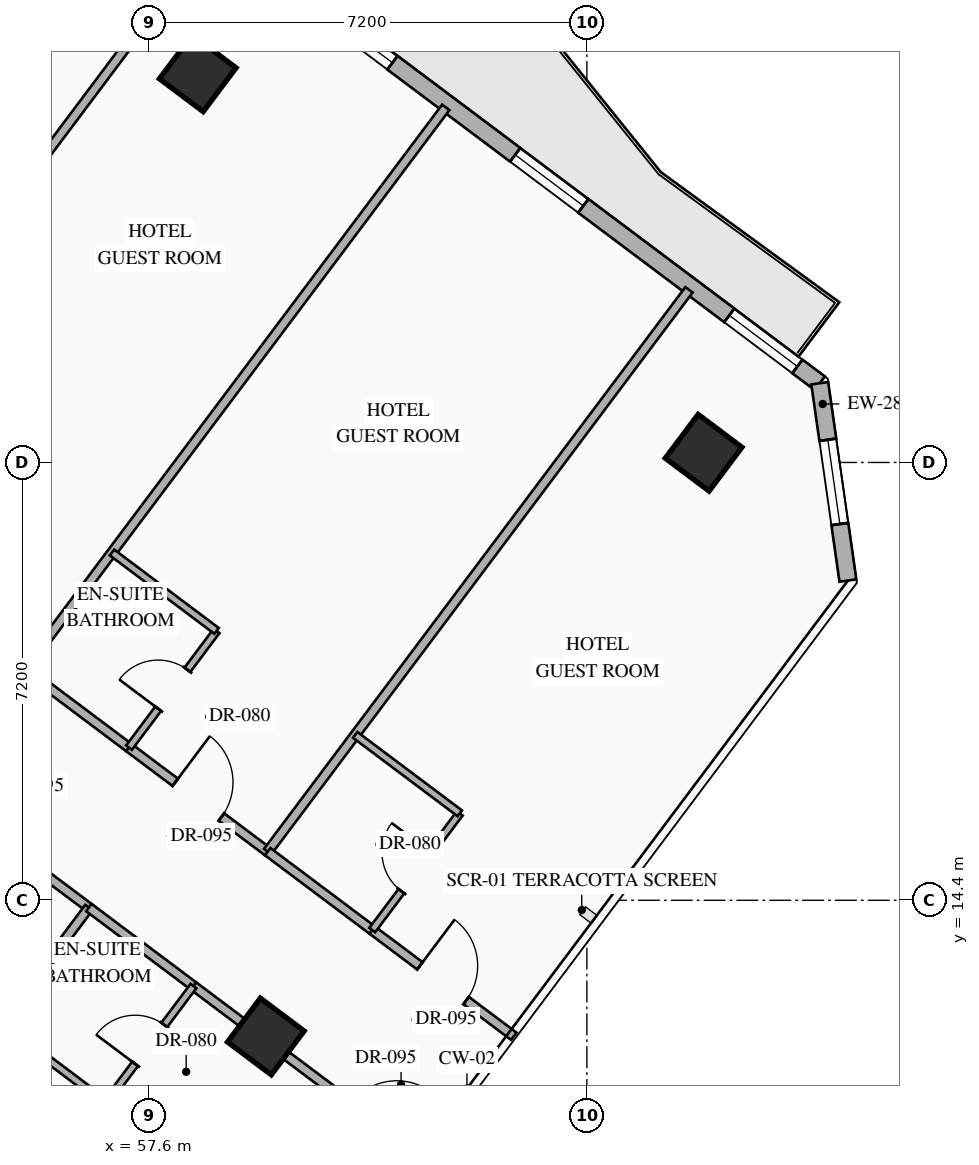
"""IFC4 building model, lengths in metres.
Left out: names, types, materials, properties, quantities, classifications, styles, units other than length and angle.
Written with IfcOpenShell. Run it as: python <this file> out.ifc"""

import sys

from ifc_helpers import new_model, si_unit, direction, frame, frame_2d, origin, origin_2d, place, context, subcontext, project, spatial, rectangle, hollow_rectangle, extrude, element, fill, save


model = new_model("IFC4")
c1 = context("Model", 3, precision=1e-05, world=origin(), true_north=direction((0.0, 1.0)))
c2 = subcontext(c1, "Body", "Model", "MODEL_VIEW")
j1 = project(units=[si_unit("LENGTHUNIT", "METRE"), si_unit("PLANEANGLEUNIT", "RADIAN")], contexts=[c1])
p1 = place(None, origin())
s1 = spatial("IfcSite", under=j1, at=p1, CompositionType="ELEMENT")
p2 = place(p1, origin())
s2 = spatial("IfcBuilding", under=s1, at=p2, CompositionType="ELEMENT")
p3 = place(p2, frame((0.0, 0.0, 81.3)))
s3 = spatial("IfcBuildingStorey", under=s2, at=p3, CompositionType="ELEMENT", Elevation=81.3)
for number, where, z_axis, x_axis in (
    (1, (58.4, 28.0, 0.0), (0.0, 0.0, 1.0), (0.8, -0.6, 0.0)),
    (2, (66.72, 21.76, 0.0), (0.0, 0.0, 1.0), (0.8, -0.6, 0.0)),
    (3, (59.52, 12.16, 0.0), (0.0, 0.0, 1.0), (0.8, -0.6, 0.0)),
):
    element("IfcColumn", number, at=place(p3, frame(where, z_axis=z_axis, x_axis=x_axis)), inside=s3, PredefinedType="COLUMN", context=c2, shape_type="SweptSolid", body=[
        extrude(hollow_rectangle(XDim=0.9, YDim=0.9, WallThickness=0.036, at=origin_2d()), origin(), (0.0, 0.0, 1.0), 3.35),
    ])
p4 = place(p3, frame((44.86, 40.73, 0.0), z_axis=(0.0, 0.0, 1.0), x_axis=(0.800006902154, -0.599990797017, 0.0)))
e4 = element("IfcWall", 4, at=p4, inside=s3, PredefinedType="STANDARD", context=c2, shape_type="SweptSolid", body=[
    extrude(rectangle(XDim=29.712, YDim=0.28, at=frame_2d((14.856, 0.0))), origin(), (0.0, 0.0, 1.0), 3.13),
])
p5 = place(p4, frame((14.249, 0.0, 0.0)))
e5 = element("IfcOpeningElement", 5, at=p5, cuts=e4, PredefinedType="OPENING", context=c2, shape_type="SweptSolid", body=[
    extrude(rectangle(XDim=1.1, YDim=2.2, at=frame_2d((0.55, 1.1))), frame((0.0, 0.15, 0.0), z_axis=(0.0, -1.0, 0.0), x_axis=(1.0, 0.0, 0.0)), (0.0, 0.0, 1.0), 0.3),
])
p6 = place(p4, frame((1.612, 0.0, 0.85)))
e6 = element("IfcOpeningElement", 6, at=p6, cuts=e4, PredefinedType="OPENING", context=c2, shape_type="SweptSolid", body=[
    extrude(rectangle(XDim=1.4, YDim=1.8, at=frame_2d((0.7, 0.9))), frame((0.0, 0.15, 0.0), z_axis=(0.0, -1.0, 0.0), x_axis=(1.0, 0.0, 0.0)), (0.0, 0.0, 1.0), 0.3),
])
p7 = place(p4, frame((5.667, 0.0, 0.85)))
e7 = element("IfcOpeningElement", 7, at=p7, cuts=e4, PredefinedType="OPENING", context=c2, shape_type="SweptSolid", body=[
    extrude(rectangle(XDim=1.4, YDim=1.8, at=frame_2d((0.7, 0.9))), frame((0.0, 0.15, 0.0), z_axis=(0.0, -1.0, 0.0), x_axis=(1.0, 0.0, 0.0)), (0.0, 0.0, 1.0), 0.3),
])
p8 = place(p4, frame((9.912, 0.0, 0.85)))
e8 = element("IfcOpeningElement", 8, at=p8, cuts=e4, PredefinedType="OPENING", context=c2, shape_type="SweptSolid", body=[
    extrude(rectangle(XDim=1.4, YDim=1.8, at=frame_2d((0.7, 0.9))), frame((0.0, 0.15, 0.0), z_axis=(0.0, -1.0, 0.0), x_axis=(1.0, 0.0, 0.0)), (0.0, 0.0, 1.0), 0.3),
])
p9 = place(p4, frame((19.528, 0.0, 0.85)))
e9 = element("IfcOpeningElement", 9, at=p9, cuts=e4, PredefinedType="OPENING", context=c2, shape_type="SweptSolid", body=[
    extrude(rectangle(XDim=1.4, YDim=1.8, at=frame_2d((0.7, 0.9))), frame((0.0, 0.15, 0.0), z_axis=(0.0, -1.0, 0.0), x_axis=(1.0, 0.0, 0.0)), (0.0, 0.0, 1.0), 0.3),
])
p10 = place(p4, frame((23.451, 0.0, 0.85)))
e10 = element("IfcOpeningElement", 10, at=p10, cuts=e4, PredefinedType="OPENING", context=c2, shape_type="SweptSolid", body=[
    extrude(rectangle(XDim=1.4, YDim=1.8, at=frame_2d((0.7, 0.9))), frame((0.0, 0.15, 0.0), z_axis=(0.0, -1.0, 0.0), x_axis=(1.0, 0.0, 0.0)), (0.0, 0.0, 1.0), 0.3),
])
p11 = place(p4, frame((27.852, 0.0, 0.85)))
e11 = element("IfcOpeningElement", 11, at=p11, cuts=e4, PredefinedType="OPENING", context=c2, shape_type="SweptSolid", body=[
    extrude(rectangle(XDim=1.4, YDim=1.8, at=frame_2d((0.7, 0.9))), frame((0.0, 0.15, 0.0), z_axis=(0.0, -1.0, 0.0), x_axis=(1.0, 0.0, 0.0)), (0.0, 0.0, 1.0), 0.3),
])
p12 = place(p3, frame((68.63, 22.903, 0.0), z_axis=(0.0, 0.0, 1.0), x_axis=(0.141285803956, -0.989968848803, 0.0)))
e12 = element("IfcWall", 12, at=p12, inside=s3, PredefinedType="STANDARD", context=c2, shape_type="SweptSolid", body=[
    extrude(rectangle(XDim=3.278, YDim=0.28, at=frame_2d((1.639, 0.0))), origin(), (0.0, 0.0, 1.0), 3.13),
])
p13 = place(p12, frame((0.939, 0.0, 0.85)))
e13 = element("IfcOpeningElement", 13, at=p13, cuts=e12, PredefinedType="OPENING", context=c2, shape_type="SweptSolid", body=[
    extrude(rectangle(XDim=1.4, YDim=1.8, at=frame_2d((0.7, 0.9))), frame((0.0, 0.15, 0.0), z_axis=(0.0, -1.0, 0.0), x_axis=(1.0, 0.0, 0.0)), (0.0, 0.0, 1.0), 0.3),
])
for number, where, z_axis, x_axis in (
    (14, (51.71, 21.08, 0.0), (0.0, 0.0, 1.0), (0.6, 0.8, 0.0)),
    (15, (55.55, 18.2, 0.0), (0.0, 0.0, 1.0), (0.6, 0.8, 0.0)),
):
    element("IfcWall", number, at=place(p3, frame(where, z_axis=z_axis, x_axis=x_axis)), inside=s3, PredefinedType="PARTITIONING", context=c2, shape_type="SweptSolid", body=[
        extrude(rectangle(XDim=11.55, YDim=0.15, at=frame_2d((5.775, 0.0))), origin(), (0.0, 0.0, 1.0), 3.13),
    ])
p14 = place(p3, frame((55.55, 18.2, 0.0), z_axis=(0.0, 0.0, 1.0), x_axis=(0.79998637334, -0.60001816845, 0.0)))
e16 = element("IfcWall", 16, at=p14, inside=s3, PredefinedType="PARTITIONING", context=c2, shape_type="SweptSolid", body=[
    extrude(rectangle(XDim=2.15, YDim=0.15, at=frame_2d((1.075, 0.0))), origin(), (0.0, 0.0, 1.0), 2.775),
])
p15 = place(p3, frame((57.27, 16.91, 0.0), z_axis=(0.0, 0.0, 1.0), x_axis=(0.800010279488, -0.599986293772, 0.0)))
e17 = element("IfcWall", 17, at=p15, inside=s3, PredefinedType="PARTITIONING", context=c2, shape_type="SweptSolid", body=[
    extrude(rectangle(XDim=2.85, YDim=0.15, at=frame_2d((1.425, 0.0))), origin(), (0.0, 0.0, 1.0), 2.775),
])
p16 = place(p15, frame((0.95, 0.0, 0.0)))
e18 = element("IfcOpeningElement", 18, at=p16, cuts=e17, PredefinedType="OPENING", context=c2, shape_type="SweptSolid", body=[
    extrude(rectangle(XDim=0.95, YDim=2.15, at=frame_2d((0.475, 1.075))), frame((0.0, 0.085, 0.0), z_axis=(0.0, -1.0, 0.0), x_axis=(1.0, 0.0, 0.0)), (0.0, 0.0, 1.0), 0.17),
])
p17 = place(p3, frame((57.27, 16.91, 0.0), z_axis=(0.0, 0.0, 1.0), x_axis=(0.599951172744, 0.800036618114, 0.0)))
e19 = element("IfcWall", 19, at=p17, inside=s3, PredefinedType="PARTITIONING", context=c2, shape_type="SweptSolid", body=[
    extrude(rectangle(XDim=2.4, YDim=0.12, at=frame_2d((1.2, 0.0))), origin(), (0.0, 0.0, 1.0), 3.13),
])
p18 = place(p17, frame((0.8, 0.0, 0.0)))
e20 = element("IfcOpeningElement", 20, at=p18, cuts=e19, PredefinedType="OPENING", context=c2, shape_type="SweptSolid", body=[
    extrude(rectangle(XDim=0.8, YDim=2.06, at=frame_2d((0.4, 1.03))), frame((0.0, 0.07, 0.0), z_axis=(0.0, -1.0, 0.0), x_axis=(1.0, 0.0, 0.0)), (0.0, 0.0, 1.0), 0.14),
])
p19 = place(p3, frame((56.99, 20.12, 0.0), z_axis=(0.0, 0.0, 1.0), x_axis=(0.79998637334, -0.60001816845, 0.0)))
e21 = element("IfcWall", 21, at=p19, inside=s3, PredefinedType="PARTITIONING", context=c2, shape_type="SweptSolid", body=[
    extrude(rectangle(XDim=2.15, YDim=0.12, at=frame_2d((1.075, 0.0))), origin(), (0.0, 0.0, 1.0), 3.13),
])
p20 = place(p3, frame((59.55, 15.2, 0.0), z_axis=(0.0, 0.0, 1.0), x_axis=(0.599996617946, 0.80000253653, 0.0)))
e22 = element("IfcWall", 22, at=p20, inside=s3, PredefinedType="PARTITIONING", context=c2, shape_type="SweptSolid", body=[
    extrude(rectangle(XDim=11.55, YDim=0.15, at=frame_2d((5.775, 0.0))), origin(), (0.0, 0.0, 1.0), 3.13),
])
p21 = place(p3, frame((59.55, 15.2, 0.0), z_axis=(0.0, 0.0, 1.0), x_axis=(0.79998637334, -0.60001816845, 0.0)))
e23 = element("IfcWall", 23, at=p21, inside=s3, PredefinedType="PARTITIONING", context=c2, shape_type="SweptSolid", body=[
    extrude(rectangle(XDim=2.15, YDim=0.15, at=frame_2d((1.075, 0.0))), origin(), (0.0, 0.0, 1.0), 2.775),
])
p22 = place(p3, frame((61.27, 13.91, 0.0), z_axis=(0.0, 0.0, 1.0), x_axis=(0.800010068184, -0.59998657552, 0.0)))
e24 = element("IfcWall", 24, at=p22, inside=s3, PredefinedType="PARTITIONING", context=c2, shape_type="SweptSolid", body=[
    extrude(rectangle(XDim=2.91, YDim=0.15, at=frame_2d((1.455, 0.0))), origin(), (0.0, 0.0, 1.0), 3.13),
])
p23 = place(p22, frame((0.98, 0.0, 0.0)))
e25 = element("IfcOpeningElement", 25, at=p23, cuts=e24, PredefinedType="OPENING", context=c2, shape_type="SweptSolid", body=[
    extrude(rectangle(XDim=0.95, YDim=2.15, at=frame_2d((0.475, 1.075))), frame((0.0, 0.085, 0.0), z_axis=(0.0, -1.0, 0.0), x_axis=(1.0, 0.0, 0.0)), (0.0, 0.0, 1.0), 0.17),
])
p24 = place(p3, frame((61.27, 13.91, 0.0), z_axis=(0.0, 0.0, 1.0), x_axis=(0.599951172744, 0.800036618114, 0.0)))
e26 = element("IfcWall", 26, at=p24, inside=s3, PredefinedType="PARTITIONING", context=c2, shape_type="SweptSolid", body=[
    extrude(rectangle(XDim=2.4, YDim=0.12, at=frame_2d((1.2, 0.0))), origin(), (0.0, 0.0, 1.0), 3.13),
])
p25 = place(p24, frame((0.8, 0.0, 0.0)))
e27 = element("IfcOpeningElement", 27, at=p25, cuts=e26, PredefinedType="OPENING", context=c2, shape_type="SweptSolid", body=[
    extrude(rectangle(XDim=0.8, YDim=2.06, at=frame_2d((0.4, 1.03))), frame((0.0, 0.07, 0.0), z_axis=(0.0, -1.0, 0.0), x_axis=(1.0, 0.0, 0.0)), (0.0, 0.0, 1.0), 0.14),
])
p26 = place(p3, frame((60.99, 17.12, 0.0), z_axis=(0.0, 0.0, 1.0), x_axis=(0.79998637334, -0.60001816845, 0.0)))
e28 = element("IfcWall", 28, at=p26, inside=s3, PredefinedType="PARTITIONING", context=c2, shape_type="SweptSolid", body=[
    extrude(rectangle(XDim=2.15, YDim=0.12, at=frame_2d((1.075, 0.0))), origin(), (0.0, 0.0, 1.0), 3.13),
])
p27 = place(p3, frame((52.89, 17.07, 0.0), z_axis=(0.0, 0.0, 1.0), x_axis=(0.800012600101, -0.599983199498, 0.0)))
e29 = element("IfcWall", 29, at=p27, inside=s3, PredefinedType="PARTITIONING", context=c2, shape_type="SweptSolid", body=[
    extrude(rectangle(XDim=4.65, YDim=0.15, at=frame_2d((2.325, 0.0))), origin(), (0.0, 0.0, 1.0), 2.425),
])
p28 = place(p27, frame((1.85, 0.0, 0.0)))
e30 = element("IfcOpeningElement", 30, at=p28, cuts=e29, PredefinedType="OPENING", context=c2, shape_type="SweptSolid", body=[
    extrude(rectangle(XDim=0.95, YDim=2.15, at=frame_2d((0.475, 1.075))), frame((0.0, 0.085, 0.0), z_axis=(0.0, -1.0, 0.0), x_axis=(1.0, 0.0, 0.0)), (0.0, 0.0, 1.0), 0.17),
])
p29 = place(p3, frame((49.8, 5.2, 0.0), z_axis=(0.0, 0.0, 1.0), x_axis=(0.6, 0.8, 0.0)))
e31 = element("IfcWall", 31, at=p29, inside=s3, PredefinedType="PARTITIONING", context=c2, shape_type="SweptSolid", body=[
    extrude(rectangle(XDim=11.35, YDim=0.15, at=frame_2d((5.675, 0.0))), origin(), (0.0, 0.0, 1.0), 3.13),
])
p30 = place(p3, frame((56.61, 14.28, 0.0), z_axis=(0.0, 0.0, 1.0), x_axis=(0.79998637334, -0.60001816845, 0.0)))
e32 = element("IfcWall", 32, at=p30, inside=s3, PredefinedType="PARTITIONING", context=c2, shape_type="SweptSolid", body=[
    extrude(rectangle(XDim=2.15, YDim=0.15, at=frame_2d((1.075, 0.0))), origin(), (0.0, 0.0, 1.0), 2.425),
])
p31 = place(p3, frame((58.33, 12.99, 0.0), z_axis=(0.0, 0.0, 1.0), x_axis=(0.799993779569, -0.600008293819, 0.0)))
e33 = element("IfcWall", 33, at=p31, inside=s3, PredefinedType="PARTITIONING", context=c2, shape_type="SweptSolid", body=[
    extrude(rectangle(XDim=4.71, YDim=0.15, at=frame_2d((2.355, 0.0))), origin(), (0.0, 0.0, 1.0), 2.425),
])
p32 = place(p31, frame((3.23, 0.0, 0.0)))
e34 = element("IfcOpeningElement", 34, at=p32, cuts=e33, PredefinedType="OPENING", context=c2, shape_type="SweptSolid", body=[
    extrude(rectangle(XDim=0.95, YDim=2.15, at=frame_2d((0.475, 1.075))), frame((0.0, 0.085, 0.0), z_axis=(0.0, -1.0, 0.0), x_axis=(1.0, 0.0, 0.0)), (0.0, 0.0, 1.0), 0.17),
])
p33 = place(p3, frame((56.89, 11.07, 0.0), z_axis=(0.0, 0.0, 1.0), x_axis=(0.600065100855, 0.79995117022, 0.0)))
e35 = element("IfcWall", 35, at=p33, inside=s3, PredefinedType="PARTITIONING", context=c2, shape_type="SweptSolid", body=[
    extrude(rectangle(XDim=2.4, YDim=0.12, at=frame_2d((1.2, 0.0))), origin(), (0.0, 0.0, 1.0), 3.13),
])
p34 = place(p33, frame((0.8, 0.0, 0.0)))
e36 = element("IfcOpeningElement", 36, at=p34, cuts=e35, PredefinedType="OPENING", context=c2, shape_type="SweptSolid", body=[
    extrude(rectangle(XDim=0.8, YDim=2.06, at=frame_2d((0.4, 1.03))), frame((0.0, 0.07, 0.0), z_axis=(0.0, -1.0, 0.0), x_axis=(1.0, 0.0, 0.0)), (0.0, 0.0, 1.0), 0.14),
])
p35 = place(p3, frame((55.17, 12.36, 0.0), z_axis=(0.0, 0.0, 1.0), x_axis=(0.79998637334, -0.60001816845, 0.0)))
e37 = element("IfcWall", 37, at=p35, inside=s3, PredefinedType="PARTITIONING", context=c2, shape_type="SweptSolid", body=[
    extrude(rectangle(XDim=2.15, YDim=0.12, at=frame_2d((1.075, 0.0))), origin(), (0.0, 0.0, 1.0), 3.13),
])
p36 = place(p9, origin())
e38 = element("IfcWindow", 38, at=p36, inside=s3, PartitioningType="SINGLE_PANEL", PredefinedType="WINDOW", context=c2, shape_type="SweptSolid", body=[
    extrude(rectangle(XDim=1.4, YDim=1.8, at=frame_2d((0.7, 0.9))), frame((0.0, 0.03, 0.0), z_axis=(0.0, -1.0, 0.0), x_axis=(1.0, 0.0, 0.0)), (0.0, 0.0, 1.0), 0.06),
])
fill(e9, e38)
p37 = place(p10, origin())
e39 = element("IfcWindow", 39, at=p37, inside=s3, PartitioningType="SINGLE_PANEL", PredefinedType="WINDOW", context=c2, shape_type="SweptSolid", body=[
    extrude(rectangle(XDim=1.4, YDim=1.8, at=frame_2d((0.7, 0.9))), frame((0.0, 0.03, 0.0), z_axis=(0.0, -1.0, 0.0), x_axis=(1.0, 0.0, 0.0)), (0.0, 0.0, 1.0), 0.06),
])
fill(e10, e39)
p38 = place(p11, origin())
e40 = element("IfcWindow", 40, at=p38, inside=s3, PartitioningType="SINGLE_PANEL", PredefinedType="WINDOW", context=c2, shape_type="SweptSolid", body=[
    extrude(rectangle(XDim=1.4, YDim=1.8, at=frame_2d((0.7, 0.9))), frame((0.0, 0.03, 0.0), z_axis=(0.0, -1.0, 0.0), x_axis=(1.0, 0.0, 0.0)), (0.0, 0.0, 1.0), 0.06),
])
fill(e11, e40)
p39 = place(p13, origin())
e41 = element("IfcWindow", 41, at=p39, inside=s3, PartitioningType="SINGLE_PANEL", PredefinedType="WINDOW", context=c2, shape_type="SweptSolid", body=[
    extrude(rectangle(XDim=1.4, YDim=1.8, at=frame_2d((0.7, 0.9))), frame((0.0, 0.03, 0.0), z_axis=(0.0, -1.0, 0.0), x_axis=(1.0, 0.0, 0.0)), (0.0, 0.0, 1.0), 0.06),
])
fill(e13, e41)
p40 = place(p16, origin())
e42 = element("IfcDoor", 42, at=p40, inside=s3, OperationType="SINGLE_SWING_LEFT", PredefinedType="DOOR", context=c2, shape_type="SweptSolid", body=[
    extrude(rectangle(XDim=0.95, YDim=2.15, at=frame_2d((0.475, 1.075))), frame((0.0, 0.025, 0.0), z_axis=(0.0, -1.0, 0.0), x_axis=(1.0, 0.0, 0.0)), (0.0, 0.0, 1.0), 0.05),
])
fill(e18, e42)
p41 = place(p18, origin())
e43 = element("IfcDoor", 43, at=p41, inside=s3, OperationType="SINGLE_SWING_LEFT", PredefinedType="DOOR", context=c2, shape_type="SweptSolid", body=[
    extrude(rectangle(XDim=0.8, YDim=2.06, at=frame_2d((0.4, 1.03))), frame((0.0, 0.025, 0.0), z_axis=(0.0, -1.0, 0.0), x_axis=(1.0, 0.0, 0.0)), (0.0, 0.0, 1.0), 0.05),
])
fill(e20, e43)
p42 = place(p23, origin())
e44 = element("IfcDoor", 44, at=p42, inside=s3, OperationType="SINGLE_SWING_LEFT", PredefinedType="DOOR", context=c2, shape_type="SweptSolid", body=[
    extrude(rectangle(XDim=0.95, YDim=2.15, at=frame_2d((0.475, 1.075))), frame((0.0, 0.025, 0.0), z_axis=(0.0, -1.0, 0.0), x_axis=(1.0, 0.0, 0.0)), (0.0, 0.0, 1.0), 0.05),
])
fill(e25, e44)
p43 = place(p25, origin())
e45 = element("IfcDoor", 45, at=p43, inside=s3, OperationType="SINGLE_SWING_RIGHT", PredefinedType="DOOR", context=c2, shape_type="SweptSolid", body=[
    extrude(rectangle(XDim=0.8, YDim=2.06, at=frame_2d((0.4, 1.03))), frame((0.0, 0.025, 0.0), z_axis=(0.0, -1.0, 0.0), x_axis=(1.0, 0.0, 0.0)), (0.0, 0.0, 1.0), 0.05),
])
fill(e27, e45)
p44 = place(p34, origin())
e46 = element("IfcDoor", 46, at=p44, inside=s3, OperationType="SINGLE_SWING_LEFT", PredefinedType="DOOR", context=c2, shape_type="SweptSolid", body=[
    extrude(rectangle(XDim=0.8, YDim=2.06, at=frame_2d((0.4, 1.03))), frame((0.0, 0.025, 0.0), z_axis=(0.0, -1.0, 0.0), x_axis=(1.0, 0.0, 0.0)), (0.0, 0.0, 1.0), 0.05),
])
fill(e36, e46)
save(model, sys.argv[1])
